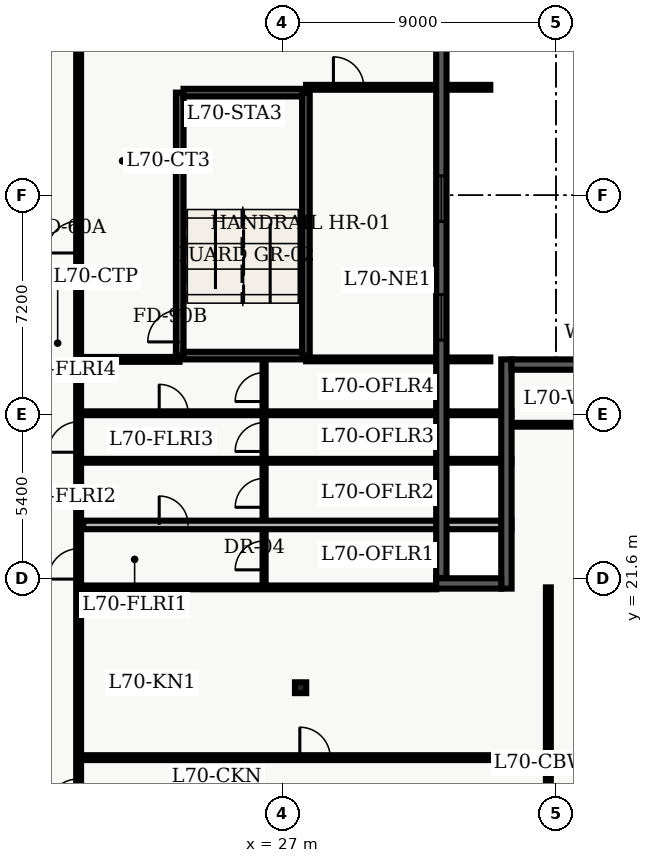
"""IFC4 building model, lengths in metres.
Left out: names, types, materials, properties, quantities, classifications, styles, units other than length and angle.
Written with IfcOpenShell. Run it as: python <this file> out.ifc"""

import sys

from ifc_helpers import new_model, entity, si_unit, converted_unit, direction, frame, origin_with_axes, origin_2d_with_axis, place, context, subcontext, project, spatial, polyline, rectangle, i_section, outline, extrude, element, fill, save


model = new_model("IFC4")
c1 = context("Model", 3, precision=1e-05, world=origin_with_axes(), true_north=direction((0.0, 1.0)))
c2 = subcontext(c1, "Body", "Model", "MODEL_VIEW")
j1 = project(units=[si_unit("LENGTHUNIT", "METRE"), converted_unit("PLANEANGLEUNIT", "DEGREE", entity("IfcPlaneAngleMeasure", 0.017), si_unit("PLANEANGLEUNIT", "RADIAN"), dimensions=[0, 0, 0, 0, 0, 0, 0])], contexts=[c1])
p1 = place(None, origin_with_axes())
s1 = spatial("IfcSite", under=j1, at=p1, CompositionType="ELEMENT")
p2 = place(p1, origin_with_axes())
s2 = spatial("IfcBuilding", under=s1, at=p2, CompositionType="ELEMENT")
p3 = place(p2, frame((0.0, 0.0, 284.1), z_axis=(0.0, 0.0, 1.0), x_axis=(1.0, 0.0, 0.0)))
s3 = spatial("IfcBuildingStorey", under=s2, at=p3, CompositionType="ELEMENT", Elevation=284.1)
p4 = place(p3, frame((23.625, 28.925, 0.0), z_axis=(0.0, 0.0, 1.0), x_axis=(0.0, 1.0, 0.0)))
e1 = element("IfcWall", 1, at=p4, inside=s3, PredefinedType="SHEAR", context=c2, shape_type="SweptSolid", body=[
    extrude(outline(polyline([(0.0, -0.125), (8.65, -0.125), (8.65, 0.125), (0.0, 0.125), (0.0, -0.125)])), origin_with_axes(), (0.0, 0.0, 1.0), 3.6),
])
p5 = place(p4, frame((0.975, 0.0, 0.0), z_axis=(0.0, 0.0, 1.0), x_axis=(1.0, 0.0, 0.0)))
e2 = element("IfcOpeningElement", 2, at=p5, cuts=e1, PredefinedType="OPENING", context=c2, shape_type="SweptSolid", body=[
    extrude(rectangle(XDim=1.05, YDim=0.27, at=origin_2d_with_axis()), origin_with_axes(), (0.0, 0.0, 1.0), 2.15),
])
p6 = place(p3, frame((27.775, 28.925, 0.0), z_axis=(0.0, 0.0, 1.0), x_axis=(0.0, 1.0, 0.0)))
e3 = element("IfcWall", 3, at=p6, inside=s3, PredefinedType="SHEAR", context=c2, shape_type="SweptSolid", body=[
    extrude(outline(polyline([(0.0, -0.125), (8.65, -0.125), (8.65, 0.125), (0.0, 0.125), (0.0, -0.125)])), origin_with_axes(), (0.0, 0.0, 1.0), 3.6),
])
for number, where, z_axis, x_axis in (
    (4, (23.75, 28.925, 0.0), (0.0, 0.0, 1.0), (1.0, 0.0, 0.0)),
    (5, (23.75, 37.575, 0.0), (0.0, 0.0, 1.0), (1.0, 0.0, 0.0)),
):
    element("IfcWall", number, at=place(p3, frame(where, z_axis=z_axis, x_axis=x_axis)), inside=s3, PredefinedType="SHEAR", context=c2, shape_type="SweptSolid", body=[
        extrude(outline(polyline([(0.0, -0.125), (3.9, -0.125), (3.9, 0.125), (0.0, 0.125), (0.0, -0.125)])), origin_with_axes(), (0.0, 0.0, 1.0), 3.6),
    ])
p7 = place(p3, frame((27.6, 18.0, 0.0), z_axis=(0.0, 0.0, 1.0), x_axis=(1.0, 0.0, 0.0)))
e6 = element("IfcColumn", 6, at=p7, inside=s3, PredefinedType="COLUMN", context=c2, shape_type="SweptSolid", body=[
    extrude(i_section(OverallWidth=0.369, OverallDepth=0.356, WebThickness=0.011, FlangeThickness=0.018, FilletRadius=0.018, at=origin_2d_with_axis()), origin_with_axes(), (0.0, 0.0, 1.0), 3.9),
])
p8 = place(p3, frame((20.3, 7.8, 0.0), z_axis=(0.0, 0.0, 1.0), x_axis=(0.0, 1.0, 0.0)))
e7 = element("IfcWall", 7, at=p8, inside=s3, PredefinedType="PARTITIONING", context=c2, shape_type="SweptSolid", body=[
    extrude(outline(polyline([(0.0, -0.08), (32.7, -0.08), (32.7, 0.08), (0.0, 0.08), (0.0, -0.08)])), origin_with_axes(), (0.0, 0.0, 1.0), 2.64),
])
p9 = place(p8, frame((25.025, 0.0, 0.0), z_axis=(0.0, 0.0, 1.0), x_axis=(1.0, 0.0, 0.0)))
e8 = element("IfcOpeningElement", 8, at=p9, cuts=e7, PredefinedType="OPENING", context=c2, shape_type="SweptSolid", body=[
    extrude(rectangle(XDim=1.05, YDim=0.18, at=origin_2d_with_axis()), origin_with_axes(), (0.0, 0.0, 1.0), 2.15),
])
p10 = place(p8, frame((14.273, 0.0, 0.0), z_axis=(0.0, 0.0, 1.0), x_axis=(1.0, 0.0, 0.0)))
e9 = element("IfcOpeningElement", 9, at=p10, cuts=e7, PredefinedType="OPENING", context=c2, shape_type="SweptSolid", body=[
    extrude(rectangle(XDim=1.0, YDim=0.18, at=origin_2d_with_axis()), origin_with_axes(), (0.0, 0.0, 1.0), 2.15),
])
p11 = place(p8, frame((18.447, 0.0, 0.0), z_axis=(0.0, 0.0, 1.0), x_axis=(1.0, 0.0, 0.0)))
e10 = element("IfcOpeningElement", 10, at=p11, cuts=e7, PredefinedType="OPENING", context=c2, shape_type="SweptSolid", body=[
    extrude(rectangle(XDim=1.0, YDim=0.18, at=origin_2d_with_axis()), origin_with_axes(), (0.0, 0.0, 1.0), 2.15),
])
p12 = place(p8, frame((6.675, 0.0, 0.0), z_axis=(0.0, 0.0, 1.0), x_axis=(1.0, 0.0, 0.0)))
e11 = element("IfcOpeningElement", 11, at=p12, cuts=e7, PredefinedType="OPENING", context=c2, shape_type="SweptSolid", body=[
    extrude(rectangle(XDim=1.05, YDim=0.18, at=origin_2d_with_axis()), origin_with_axes(), (0.0, 0.0, 1.0), 2.15),
])
p13 = place(p3, frame((20.3, 28.8, 0.0), z_axis=(0.0, 0.0, 1.0), x_axis=(1.0, 0.0, 0.0)))
e12 = element("IfcWall", 12, at=p13, inside=s3, PredefinedType="PARTITIONING", context=c2, shape_type="SweptSolid", body=[
    extrude(outline(polyline([(0.0, -0.08), (3.32, -0.08), (3.32, 0.08), (0.0, 0.08), (0.0, -0.08)])), origin_with_axes(), (0.0, 0.0, 1.0), 2.64),
])
p14 = place(p3, frame((26.4, 21.42, 0.0), z_axis=(0.0, 0.0, 1.0), x_axis=(0.0, 1.0, 0.0)))
e13 = element("IfcWall", 13, at=p14, inside=s3, PredefinedType="PARTITIONING", context=c2, shape_type="SweptSolid", body=[
    extrude(outline(polyline([(0.0, -0.05), (7.26, -0.05), (7.26, 0.05), (0.0, 0.05), (0.0, -0.05)])), origin_with_axes(), (0.0, 0.0, 1.0), 2.64),
])
p15 = place(p14, frame((0.932, 0.0, 0.0), z_axis=(0.0, 0.0, 1.0), x_axis=(1.0, 0.0, 0.0)))
e14 = element("IfcOpeningElement", 14, at=p15, cuts=e13, PredefinedType="OPENING", context=c2, shape_type="SweptSolid", body=[
    extrude(rectangle(XDim=0.95, YDim=0.12, at=origin_2d_with_axis()), origin_with_axes(), (0.0, 0.0, 1.0), 2.15),
])
p16 = place(p14, frame((2.99, 0.0, 0.0), z_axis=(0.0, 0.0, 1.0), x_axis=(1.0, 0.0, 0.0)))
e15 = element("IfcOpeningElement", 15, at=p16, cuts=e13, PredefinedType="OPENING", context=c2, shape_type="SweptSolid", body=[
    extrude(rectangle(XDim=0.95, YDim=0.12, at=origin_2d_with_axis()), origin_with_axes(), (0.0, 0.0, 1.0), 2.15),
])
p17 = place(p14, frame((4.827, 0.0, 0.0), z_axis=(0.0, 0.0, 1.0), x_axis=(1.0, 0.0, 0.0)))
e16 = element("IfcOpeningElement", 16, at=p17, cuts=e13, PredefinedType="OPENING", context=c2, shape_type="SweptSolid", body=[
    extrude(rectangle(XDim=0.95, YDim=0.12, at=origin_2d_with_axis()), origin_with_axes(), (0.0, 0.0, 1.0), 2.15),
])
p18 = place(p14, frame((6.469, 0.0, 0.0), z_axis=(0.0, 0.0, 1.0), x_axis=(1.0, 0.0, 0.0)))
e17 = element("IfcOpeningElement", 17, at=p18, cuts=e13, PredefinedType="OPENING", context=c2, shape_type="SweptSolid", body=[
    extrude(rectangle(XDim=0.95, YDim=0.12, at=origin_2d_with_axis()), origin_with_axes(), (0.0, 0.0, 1.0), 2.15),
])
p19 = place(p3, frame((20.45, 23.355, 0.0), z_axis=(0.0, 0.0, 1.0), x_axis=(1.0, 0.0, 0.0)))
e18 = element("IfcWall", 18, at=p19, inside=s3, PredefinedType="PARTITIONING", context=c2, shape_type="SweptSolid", body=[
    extrude(outline(polyline([(0.0, -0.14), (14.085, -0.14), (14.085, 0.14), (0.0, 0.14), (0.0, -0.14)])), origin_with_axes(), (0.0, 0.0, 1.0), 2.64),
])
p20 = place(p19, frame((2.975, 0.0, 0.0), z_axis=(0.0, 0.0, 1.0), x_axis=(1.0, 0.0, 0.0)))
e19 = element("IfcOpeningElement", 19, at=p20, cuts=e18, PredefinedType="OPENING", context=c2, shape_type="SweptSolid", body=[
    extrude(rectangle(XDim=0.95, YDim=0.3, at=origin_2d_with_axis()), origin_with_axes(), (0.0, 0.0, 1.0), 2.15),
])
p21 = place(p3, frame((20.45, 25.465, 0.0), z_axis=(0.0, 0.0, 1.0), x_axis=(1.0, 0.0, 0.0)))
e20 = element("IfcWall", 20, at=p21, inside=s3, PredefinedType="PARTITIONING", context=c2, shape_type="SweptSolid", body=[
    extrude(outline(polyline([(0.0, -0.062), (14.085, -0.062), (14.085, 0.062), (0.0, 0.062), (0.0, -0.062)])), origin_with_axes(), (0.0, 0.0, 1.0), 2.64),
])
p22 = place(p3, frame((20.45, 27.028, 0.0), z_axis=(0.0, 0.0, 1.0), x_axis=(1.0, 0.0, 0.0)))
e21 = element("IfcWall", 21, at=p22, inside=s3, PredefinedType="PARTITIONING", context=c2, shape_type="SweptSolid", body=[
    extrude(outline(polyline([(0.0, -0.062), (14.085, -0.062), (14.085, 0.062), (0.0, 0.062), (0.0, -0.062)])), origin_with_axes(), (0.0, 0.0, 1.0), 2.64),
])
p23 = place(p22, frame((2.975, 0.0, 0.0), z_axis=(0.0, 0.0, 1.0), x_axis=(1.0, 0.0, 0.0)))
e22 = element("IfcOpeningElement", 22, at=p23, cuts=e21, PredefinedType="OPENING", context=c2, shape_type="SweptSolid", body=[
    extrude(rectangle(XDim=0.95, YDim=0.145, at=origin_2d_with_axis()), origin_with_axes(), (0.0, 0.0, 1.0), 2.15),
])
p24 = place(p3, frame((27.78, 28.8, 0.0), z_axis=(0.0, 0.0, 1.0), x_axis=(1.0, 0.0, 0.0)))
e23 = element("IfcWall", 23, at=p24, inside=s3, PredefinedType="PARTITIONING", context=c2, shape_type="SweptSolid", body=[
    extrude(outline(polyline([(0.0, -0.062), (6.06, -0.062), (6.06, 0.062), (0.0, 0.062), (0.0, -0.062)])), origin_with_axes(), (0.0, 0.0, 1.0), 2.64),
])
p25 = place(p3, frame((27.78, 37.75, 0.0), z_axis=(0.0, 0.0, 1.0), x_axis=(1.0, 0.0, 0.0)))
e24 = element("IfcWall", 24, at=p25, inside=s3, PredefinedType="PARTITIONING", context=c2, shape_type="SweptSolid", body=[
    extrude(outline(polyline([(0.0, -0.08), (6.06, -0.08), (6.06, 0.08), (0.0, 0.08), (0.0, -0.08)])), origin_with_axes(), (0.0, 0.0, 1.0), 2.64),
])
p26 = place(p25, frame((1.4, 0.0, 0.0), z_axis=(0.0, 0.0, 1.0), x_axis=(1.0, 0.0, 0.0)))
e25 = element("IfcOpeningElement", 25, at=p26, cuts=e24, PredefinedType="OPENING", context=c2, shape_type="SweptSolid", body=[
    extrude(rectangle(XDim=1.0, YDim=0.18, at=origin_2d_with_axis()), origin_with_axes(), (0.0, 0.0, 1.0), 2.15),
])
p27 = place(p3, frame((20.3, 15.7, 0.0), z_axis=(0.0, 0.0, 1.0), x_axis=(1.0, 0.0, 0.0)))
e26 = element("IfcWall", 26, at=p27, inside=s3, PredefinedType="PARTITIONING", context=c2, shape_type="SweptSolid", body=[
    extrude(outline(polyline([(0.0, -0.08), (15.45, -0.08), (15.45, 0.08), (0.0, 0.08), (0.0, -0.08)])), origin_with_axes(), (0.0, 0.0, 1.0), 2.64),
])
p28 = place(p27, frame((7.775, 0.0, 0.0), z_axis=(0.0, 0.0, 1.0), x_axis=(1.0, 0.0, 0.0)))
e27 = element("IfcOpeningElement", 27, at=p28, cuts=e26, PredefinedType="OPENING", context=c2, shape_type="SweptSolid", body=[
    extrude(rectangle(XDim=1.0, YDim=0.18, at=origin_2d_with_axis()), origin_with_axes(), (0.0, 0.0, 1.0), 2.15),
])
p29 = place(p3, frame((35.75, 4.35, 0.0), z_axis=(0.0, 0.0, 1.0), x_axis=(0.0, 1.0, 0.0)))
e28 = element("IfcWall", 28, at=p29, inside=s3, PredefinedType="PARTITIONING", context=c2, shape_type="SweptSolid", body=[
    extrude(outline(polyline([(0.0, -0.08), (16.95, -0.08), (16.95, 0.08), (0.0, 0.08), (0.0, -0.08)])), origin_with_axes(), (0.0, 0.0, 1.0), 2.64),
])
p30 = place(p3, frame((34.535, 26.65, 0.0), z_axis=(0.0, 0.0, 1.0), x_axis=(1.0, 0.0, 0.0)))
e29 = element("IfcWall", 29, at=p30, inside=s3, PredefinedType="PARTITIONING", context=c2, shape_type="SweptSolid", body=[
    extrude(outline(polyline([(0.0, -0.062), (12.995, -0.062), (12.995, 0.062), (0.0, 0.062), (0.0, -0.062)])), origin_with_axes(), (0.0, 0.0, 1.0), 2.64),
])
p31 = place(p30, frame((8.465, 0.0, 0.0), z_axis=(0.0, 0.0, 1.0), x_axis=(1.0, 0.0, 0.0)))
e30 = element("IfcOpeningElement", 30, at=p31, cuts=e29, PredefinedType="OPENING", context=c2, shape_type="SweptSolid", body=[
    extrude(rectangle(XDim=1.0, YDim=0.145, at=origin_2d_with_axis()), origin_with_axes(), (0.0, 0.0, 1.0), 2.15),
])
p32 = place(p3, frame((20.3, 21.3, 0.0), z_axis=(0.0, 0.0, 1.0), x_axis=(1.0, 0.0, 0.0)))
e31 = element("IfcWall", 31, at=p32, inside=s3, PredefinedType="PARTITIONING", context=c2, shape_type="SweptSolid", body=[
    extrude(outline(polyline([(0.0, -0.062), (11.765, -0.062), (11.765, 0.062), (0.0, 0.062), (0.0, -0.062)])), origin_with_axes(), (0.0, 0.0, 1.0), 2.64),
])
p33 = place(p3, frame((34.37, 21.26, 0.0), z_axis=(0.0, 0.0, 1.0), x_axis=(0.0, 1.0, 0.0)))
e32 = element("IfcWall", 32, at=p33, inside=s3, PredefinedType="SOLIDWALL", context=c2, shape_type="SweptSolid", body=[
    extrude(outline(polyline([(0.0, -0.17), (7.54, -0.17), (7.54, 0.17), (0.0, 0.17), (0.0, -0.17)])), origin_with_axes(), (0.0, 0.0, 1.0), 3.6),
])
p34 = place(p3, frame((34.54, 28.63, 0.0), z_axis=(0.0, 0.0, 1.0), x_axis=(1.0, 0.0, 0.0)))
e33 = element("IfcWall", 33, at=p34, inside=s3, PredefinedType="SOLIDWALL", context=c2, shape_type="SweptSolid", body=[
    extrude(outline(polyline([(0.0, -0.17), (13.16, -0.17), (13.16, 0.17), (0.0, 0.17), (0.0, -0.17)])), origin_with_axes(), (0.0, 0.0, 1.0), 3.6),
])
p35 = place(p34, frame((3.59, 0.0, 0.45), z_axis=(0.0, 0.0, 1.0), x_axis=(1.0, 0.0, 0.0)))
e34 = element("IfcOpeningElement", 34, at=p35, cuts=e33, PredefinedType="OPENING", context=c2, shape_type="SweptSolid", body=[
    extrude(rectangle(XDim=1.5, YDim=0.36, at=origin_2d_with_axis()), origin_with_axes(), (0.0, 0.0, 1.0), 2.1),
])
p36 = place(p34, frame((9.57, 0.0, 0.45), z_axis=(0.0, 0.0, 1.0), x_axis=(1.0, 0.0, 0.0)))
e35 = element("IfcOpeningElement", 35, at=p36, cuts=e33, PredefinedType="OPENING", context=c2, shape_type="SweptSolid", body=[
    extrude(rectangle(XDim=1.5, YDim=0.36, at=origin_2d_with_axis()), origin_with_axes(), (0.0, 0.0, 1.0), 2.1),
])
p37 = place(p3, frame((32.23, 41.82, 0.0), z_axis=(0.0, 0.0, 1.0), x_axis=(0.0, -1.0, 0.0)))
e36 = element("IfcWall", 36, at=p37, inside=s3, PredefinedType="SOLIDWALL", context=c2, shape_type="SweptSolid", body=[
    extrude(outline(polyline([(0.0, -0.17), (20.22, -0.17), (20.22, 0.17), (0.0, 0.17), (0.0, -0.17)])), origin_with_axes(), (0.0, 0.0, 1.0), 3.6),
])
p38 = place(p37, frame((7.732, 0.0, 0.45), z_axis=(0.0, 0.0, 1.0), x_axis=(1.0, 0.0, 0.0)))
e37 = element("IfcOpeningElement", 37, at=p38, cuts=e36, PredefinedType="OPENING", context=c2, shape_type="SweptSolid", body=[
    extrude(rectangle(XDim=1.5, YDim=0.36, at=origin_2d_with_axis()), origin_with_axes(), (0.0, 0.0, 1.0), 2.1),
])
p39 = place(p37, frame((11.637, 0.0, 0.45), z_axis=(0.0, 0.0, 1.0), x_axis=(1.0, 0.0, 0.0)))
e38 = element("IfcOpeningElement", 38, at=p39, cuts=e36, PredefinedType="OPENING", context=c2, shape_type="SweptSolid", body=[
    extrude(rectangle(XDim=1.5, YDim=0.36, at=origin_2d_with_axis()), origin_with_axes(), (0.0, 0.0, 1.0), 2.1),
])
p40 = place(p3, frame((32.06, 21.43, 0.0), z_axis=(0.0, 0.0, 1.0), x_axis=(1.0, 0.0, 0.0)))
e39 = element("IfcWall", 39, at=p40, inside=s3, PredefinedType="SOLIDWALL", context=c2, shape_type="SweptSolid", body=[
    extrude(outline(polyline([(0.0, -0.17), (2.14, -0.17), (2.14, 0.17), (0.0, 0.17), (0.0, -0.17)])), origin_with_axes(), (0.0, 0.0, 1.0), 3.6),
])
p41 = place(p4, frame((0.975, 0.0, 0.0), z_axis=(0.0, 0.0, 1.0), x_axis=(1.0, 0.0, 0.0)))
e40 = element("IfcDoor", 40, at=p41, inside=s3, OperationType="SINGLE_SWING_LEFT", PredefinedType="DOOR", context=c2, shape_type="SweptSolid", body=[
    extrude(rectangle(XDim=1.05, YDim=0.09, at=origin_2d_with_axis()), origin_with_axes(), (0.0, 0.0, 1.0), 2.15),
])
fill(e2, e40)
p42 = place(p8, frame((25.025, 0.0, 0.0), z_axis=(0.0, 0.0, 1.0), x_axis=(1.0, 0.0, 0.0)))
e41 = element("IfcDoor", 41, at=p42, inside=s3, OperationType="SINGLE_SWING_LEFT", PredefinedType="DOOR", context=c2, shape_type="SweptSolid", body=[
    extrude(rectangle(XDim=1.05, YDim=0.09, at=origin_2d_with_axis()), origin_with_axes(), (0.0, 0.0, 1.0), 2.15),
])
fill(e8, e41)
p43 = place(p14, frame((0.932, 0.0, 0.0), z_axis=(0.0, 0.0, 1.0), x_axis=(1.0, 0.0, 0.0)))
e42 = element("IfcDoor", 42, at=p43, inside=s3, OperationType="SINGLE_SWING_LEFT", PredefinedType="DOOR", context=c2, shape_type="SweptSolid", body=[
    extrude(rectangle(XDim=0.95, YDim=0.06, at=origin_2d_with_axis()), origin_with_axes(), (0.0, 0.0, 1.0), 2.15),
])
fill(e14, e42)
p44 = place(p8, frame((14.273, 0.0, 0.0), z_axis=(0.0, 0.0, 1.0), x_axis=(1.0, 0.0, 0.0)))
e43 = element("IfcDoor", 43, at=p44, inside=s3, OperationType="SINGLE_SWING_LEFT", PredefinedType="DOOR", context=c2, shape_type="SweptSolid", body=[
    extrude(rectangle(XDim=1.0, YDim=0.09, at=origin_2d_with_axis()), origin_with_axes(), (0.0, 0.0, 1.0), 2.15),
])
fill(e9, e43)
p45 = place(p14, frame((2.99, 0.0, 0.0), z_axis=(0.0, 0.0, 1.0), x_axis=(1.0, 0.0, 0.0)))
e44 = element("IfcDoor", 44, at=p45, inside=s3, OperationType="SINGLE_SWING_LEFT", PredefinedType="DOOR", context=c2, shape_type="SweptSolid", body=[
    extrude(rectangle(XDim=0.95, YDim=0.06, at=origin_2d_with_axis()), origin_with_axes(), (0.0, 0.0, 1.0), 2.15),
])
fill(e15, e44)
p46 = place(p19, frame((2.975, 0.0, 0.0), z_axis=(0.0, 0.0, 1.0), x_axis=(1.0, 0.0, 0.0)))
e45 = element("IfcDoor", 45, at=p46, inside=s3, OperationType="SINGLE_SWING_LEFT", PredefinedType="DOOR", context=c2, shape_type="SweptSolid", body=[
    extrude(rectangle(XDim=0.95, YDim=0.09, at=origin_2d_with_axis()), origin_with_axes(), (0.0, 0.0, 1.0), 2.15),
])
fill(e19, e45)
p47 = place(p14, frame((4.827, 0.0, 0.0), z_axis=(0.0, 0.0, 1.0), x_axis=(1.0, 0.0, 0.0)))
e46 = element("IfcDoor", 46, at=p47, inside=s3, OperationType="SINGLE_SWING_LEFT", PredefinedType="DOOR", context=c2, shape_type="SweptSolid", body=[
    extrude(rectangle(XDim=0.95, YDim=0.06, at=origin_2d_with_axis()), origin_with_axes(), (0.0, 0.0, 1.0), 2.15),
])
fill(e16, e46)
p48 = place(p8, frame((18.447, 0.0, 0.0), z_axis=(0.0, 0.0, 1.0), x_axis=(1.0, 0.0, 0.0)))
e47 = element("IfcDoor", 47, at=p48, inside=s3, OperationType="SINGLE_SWING_LEFT", PredefinedType="DOOR", context=c2, shape_type="SweptSolid", body=[
    extrude(rectangle(XDim=1.0, YDim=0.09, at=origin_2d_with_axis()), origin_with_axes(), (0.0, 0.0, 1.0), 2.15),
])
fill(e10, e47)
p49 = place(p14, frame((6.469, 0.0, 0.0), z_axis=(0.0, 0.0, 1.0), x_axis=(1.0, 0.0, 0.0)))
e48 = element("IfcDoor", 48, at=p49, inside=s3, OperationType="SINGLE_SWING_LEFT", PredefinedType="DOOR", context=c2, shape_type="SweptSolid", body=[
    extrude(rectangle(XDim=0.95, YDim=0.06, at=origin_2d_with_axis()), origin_with_axes(), (0.0, 0.0, 1.0), 2.15),
])
fill(e17, e48)
p50 = place(p22, frame((2.975, 0.0, 0.0), z_axis=(0.0, 0.0, 1.0), x_axis=(1.0, 0.0, 0.0)))
e49 = element("IfcDoor", 49, at=p50, inside=s3, OperationType="SINGLE_SWING_LEFT", PredefinedType="DOOR", context=c2, shape_type="SweptSolid", body=[
    extrude(rectangle(XDim=0.95, YDim=0.075, at=origin_2d_with_axis()), origin_with_axes(), (0.0, 0.0, 1.0), 2.15),
])
fill(e22, e49)
p51 = place(p25, frame((1.4, 0.0, 0.0), z_axis=(0.0, 0.0, 1.0), x_axis=(1.0, 0.0, 0.0)))
e50 = element("IfcDoor", 50, at=p51, inside=s3, OperationType="SINGLE_SWING_LEFT", PredefinedType="DOOR", context=c2, shape_type="SweptSolid", body=[
    extrude(rectangle(XDim=1.0, YDim=0.09, at=origin_2d_with_axis()), origin_with_axes(), (0.0, 0.0, 1.0), 2.15),
])
fill(e25, e50)
p52 = place(p8, frame((6.675, 0.0, 0.0), z_axis=(0.0, 0.0, 1.0), x_axis=(1.0, 0.0, 0.0)))
e51 = element("IfcDoor", 51, at=p52, inside=s3, OperationType="SINGLE_SWING_LEFT", PredefinedType="DOOR", context=c2, shape_type="SweptSolid", body=[
    extrude(rectangle(XDim=1.05, YDim=0.09, at=origin_2d_with_axis()), origin_with_axes(), (0.0, 0.0, 1.0), 2.15),
])
fill(e11, e51)
p53 = place(p27, frame((7.775, 0.0, 0.0), z_axis=(0.0, 0.0, 1.0), x_axis=(1.0, 0.0, 0.0)))
e52 = element("IfcDoor", 52, at=p53, inside=s3, OperationType="SINGLE_SWING_LEFT", PredefinedType="DOOR", context=c2, shape_type="SweptSolid", body=[
    extrude(rectangle(XDim=1.0, YDim=0.09, at=origin_2d_with_axis()), origin_with_axes(), (0.0, 0.0, 1.0), 2.15),
])
fill(e27, e52)
p54 = place(p37, frame((7.732, 0.0, 0.45), z_axis=(0.0, 0.0, 1.0), x_axis=(1.0, 0.0, 0.0)))
e53 = element("IfcWindow", 53, at=p54, inside=s3, PredefinedType="WINDOW", context=c2, shape_type="SweptSolid", body=[
    extrude(rectangle(XDim=1.5, YDim=0.09, at=origin_2d_with_axis()), origin_with_axes(), (0.0, 0.0, 1.0), 2.1),
])
fill(e37, e53)
p55 = place(p37, frame((11.637, 0.0, 0.45), z_axis=(0.0, 0.0, 1.0), x_axis=(1.0, 0.0, 0.0)))
e54 = element("IfcWindow", 54, at=p55, inside=s3, PredefinedType="WINDOW", context=c2, shape_type="SweptSolid", body=[
    extrude(rectangle(XDim=1.5, YDim=0.09, at=origin_2d_with_axis()), origin_with_axes(), (0.0, 0.0, 1.0), 2.1),
])
fill(e38, e54)
save(model, sys.argv[1])
